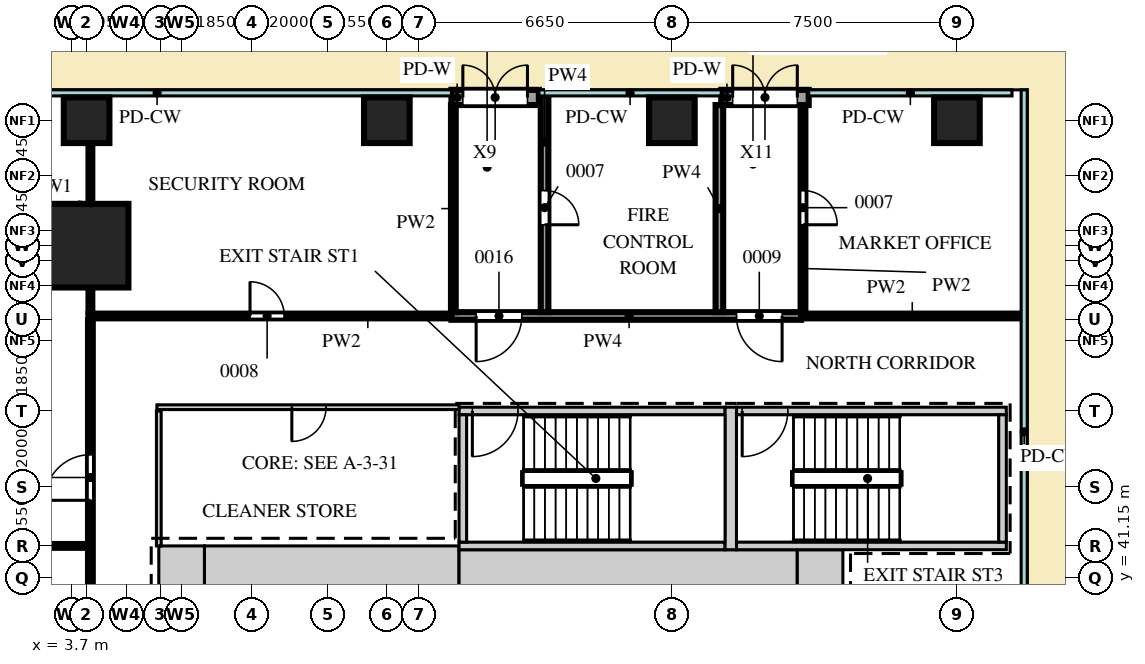
"""IFC4 building model, lengths in metres.
Left out: names, types, materials, properties, quantities, classifications, styles, units other than length and angle.
Written with IfcOpenShell. Run it as: python <this file> out.ifc"""

import sys

from ifc_helpers import new_model, si_unit, direction, frame, frame_2d, origin, origin_2d, place, context, subcontext, project, spatial, rectangle, extrude, source, transform, mapped, element, fill, save


model = new_model("IFC4")
c1 = context("Model", 3, precision=1e-05, world=origin(), true_north=direction((0.0, 1.0)))
c2 = subcontext(c1, "Body", "Model", "MODEL_VIEW")
j1 = project(units=[si_unit("LENGTHUNIT", "METRE"), si_unit("PLANEANGLEUNIT", "RADIAN")], contexts=[c1])
p1 = place(None, origin())
s1 = spatial("IfcSite", under=j1, at=p1, CompositionType="ELEMENT")
p2 = place(p1, origin())
s2 = spatial("IfcBuilding", under=s1, at=p2, CompositionType="ELEMENT")
p3 = place(p2, origin())
s3 = spatial("IfcBuildingStorey", under=s2, at=p3, CompositionType="ELEMENT", Elevation=0.0)
m1 = source(origin(), c2, "Body", "SweptSolid", [
    extrude(rectangle(XDim=6.7, YDim=1.2, at=frame_2d((3.35, 0.0))), origin(), (0.0, 0.0, 1.0), 7.2),
])
p4 = place(p3, frame((7.2, 41.4, 0.0), z_axis=(0.0, 0.0, 1.0), x_axis=(1.0, 0.0, 0.0)))
e1 = element("IfcWall", 1, at=p4, inside=s3, PredefinedType="SHEAR", context=c2, shape_type="MappedRepresentation", body=[
    mapped(m1, transform((0.0, 0.0, 0.0))),
])
m2 = source(origin(), c2, "Body", "SweptSolid", [
    extrude(rectangle(XDim=8.9, YDim=1.1, at=frame_2d((4.45, 0.0))), origin(), (0.0, 0.0, 1.0), 7.2),
])
p5 = place(p3, frame((13.9, 41.35, 0.0), z_axis=(0.0, 0.0, 1.0), x_axis=(1.0, 0.0, 0.0)))
e2 = element("IfcWall", 2, at=p5, inside=s3, PredefinedType="SHEAR", context=c2, shape_type="MappedRepresentation", body=[
    mapped(m2, transform((0.0, 0.0, 0.0))),
])
m3 = source(origin(), c2, "Body", "SweptSolid", [
    extrude(rectangle(XDim=1.2, YDim=1.1, at=frame_2d((0.6, 0.0))), origin(), (0.0, 0.0, 1.0), 7.2),
])
p6 = place(p3, frame((22.8, 41.35, 0.0), z_axis=(0.0, 0.0, 1.0), x_axis=(1.0, 0.0, 0.0)))
e3 = element("IfcWall", 3, at=p6, inside=s3, PredefinedType="SHEAR", context=c2, shape_type="MappedRepresentation", body=[
    mapped(m3, transform((0.0, 0.0, 0.0))),
])
m4 = source(origin(), c2, "Body", "SweptSolid", [
    extrude(rectangle(XDim=1.2, YDim=1.2, at=frame_2d((0.6, 0.0))), origin(), (0.0, 0.0, 1.0), 7.2),
])
p7 = place(p3, frame((6.0, 41.4, 0.0), z_axis=(0.0, 0.0, 1.0), x_axis=(1.0, 0.0, 0.0)))
e4 = element("IfcWall", 4, at=p7, inside=s3, PredefinedType="SHEAR", context=c2, shape_type="MappedRepresentation", body=[
    mapped(m4, transform((0.0, 0.0, 0.0))),
])
m5 = source(origin(), c2, "Body", "SweptSolid", [
    extrude(rectangle(XDim=7.0, YDim=0.2, at=frame_2d((3.5, 0.0))), origin(), (0.0, 0.0, 1.0), 7.2),
])
p8 = place(p3, frame((13.9, 45.55, 0.0), z_axis=(0.0, 0.0, 1.0), x_axis=(1.0, 0.0, 0.0)))
e5 = element("IfcWall", 5, at=p8, inside=s3, PredefinedType="SHEAR", context=c2, shape_type="MappedRepresentation", body=[
    mapped(m5, transform((0.0, 0.0, 0.0))),
])
m6 = source(origin(), c2, "Body", "SweptSolid", [
    extrude(rectangle(XDim=1.2, YDim=2.1, at=frame_2d((0.6, 1.05))), frame((0.0, 0.11, 0.0), z_axis=(0.0, -1.0, 0.0), x_axis=(1.0, 0.0, 0.0)), (0.0, 0.0, 1.0), 0.22),
])
p9 = place(p8, frame((0.35, 0.0, 0.0)))
e6 = element("IfcOpeningElement", 6, at=p9, cuts=e5, PredefinedType="OPENING", context=c2, shape_type="MappedRepresentation", body=[
    mapped(m6, transform((0.0, 0.0, 0.0))),
])
p10 = place(p3, frame((13.9, 42.0, 0.0), z_axis=(0.0, 0.0, 1.0), x_axis=(1.0, 0.0, 0.0)))
e7 = element("IfcWall", 7, at=p10, inside=s3, PredefinedType="SHEAR", context=c2, shape_type="MappedRepresentation", body=[
    mapped(m5, transform((0.0, 0.0, 0.0))),
])
m7 = source(origin(), c2, "Body", "SweptSolid", [
    extrude(rectangle(XDim=7.1, YDim=0.2, at=frame_2d((3.55, 0.0))), origin(), (0.0, 0.0, 1.0), 7.2),
])
p11 = place(p3, frame((21.2, 45.55, 0.0), z_axis=(0.0, 0.0, 1.0), x_axis=(1.0, 0.0, 0.0)))
e8 = element("IfcWall", 8, at=p11, inside=s3, PredefinedType="SHEAR", context=c2, shape_type="MappedRepresentation", body=[
    mapped(m7, transform((0.0, 0.0, 0.0))),
])
p12 = place(p11, frame((0.15, 0.0, 0.0)))
e9 = element("IfcOpeningElement", 9, at=p12, cuts=e8, PredefinedType="OPENING", context=c2, shape_type="MappedRepresentation", body=[
    mapped(m6, transform((0.0, 0.0, 0.0))),
])
p13 = place(p3, frame((21.2, 42.0, 0.0), z_axis=(0.0, 0.0, 1.0), x_axis=(1.0, 0.0, 0.0)))
e10 = element("IfcWall", 10, at=p13, inside=s3, PredefinedType="SHEAR", context=c2, shape_type="MappedRepresentation", body=[
    mapped(m7, transform((0.0, 0.0, 0.0))),
])
m8 = source(origin(), c2, "Body", "SweptSolid", [
    extrude(rectangle(XDim=3.75, YDim=0.3, at=frame_2d((1.875, 0.0))), origin(), (0.0, 0.0, 1.0), 7.2),
])
p14 = place(p3, frame((21.05, 41.9, 0.0), z_axis=(0.0, 0.0, 1.0), x_axis=(0.0, 1.0, 0.0)))
e11 = element("IfcWall", 11, at=p14, inside=s3, PredefinedType="SHEAR", context=c2, shape_type="MappedRepresentation", body=[
    mapped(m8, transform((0.0, 0.0, 0.0))),
])
m9 = source(origin(), c2, "Body", "SweptSolid", [
    extrude(rectangle(XDim=3.35, YDim=0.2, at=frame_2d((1.675, 0.0))), origin(), (0.0, 0.0, 1.0), 7.2),
])
for number, where, z_axis, x_axis in (
    (12, (14.0, 42.1, 0.0), (0.0, 0.0, 1.0), (0.0, 1.0, 0.0)),
    (13, (28.2, 42.1, 0.0), (0.0, 0.0, 1.0), (0.0, 1.0, 0.0)),
):
    element("IfcWall", number, at=place(p3, frame(where, z_axis=z_axis, x_axis=x_axis)), inside=s3, PredefinedType="SHEAR", context=c2, shape_type="MappedRepresentation", body=[
        mapped(m9, transform((0.0, 0.0, 0.0))),
    ])
m10 = source(origin(), c2, "Body", "SweptSolid", [
    extrude(rectangle(XDim=2.2, YDim=2.2, at=origin_2d()), origin(), (0.0, 0.0, 1.0), 7.2),
])
p15 = place(p3, frame((4.1, 49.9, 0.0), z_axis=(0.0, 0.0, 1.0), x_axis=(1.0, 0.0, 0.0)))
e14 = element("IfcColumn", 14, at=p15, inside=s3, PredefinedType="COLUMN", context=c2, shape_type="MappedRepresentation", body=[
    mapped(m10, transform((0.0, 0.0, 0.0))),
])
m11 = source(origin(), c2, "Body", "SweptSolid", [
    extrude(rectangle(XDim=1.2, YDim=1.2, at=origin_2d()), origin(), (0.0, 0.0, 1.0), 7.2),
])
for number, where, z_axis, x_axis in (
    (15, (4.1, 53.2, 0.0), (0.0, 0.0, 1.0), (1.0, 0.0, 0.0)),
    (16, (12.0, 53.2, 0.0), (0.0, 0.0, 1.0), (1.0, 0.0, 0.0)),
    (17, (19.5, 53.2, 0.0), (0.0, 0.0, 1.0), (1.0, 0.0, 0.0)),
    (18, (27.0, 53.2, 0.0), (0.0, 0.0, 1.0), (1.0, 0.0, 0.0)),
):
    element("IfcColumn", number, at=place(p3, frame(where, z_axis=z_axis, x_axis=x_axis)), inside=s3, PredefinedType="COLUMN", context=c2, shape_type="MappedRepresentation", body=[
        mapped(m11, transform((0.0, 0.0, 0.0))),
    ])
m12 = source(origin(), c2, "Body", "SweptSolid", [
    extrude(rectangle(XDim=2.3, YDim=0.4, at=frame_2d((1.15, 0.0))), origin(), (0.0, 0.0, 1.0), 7.15),
])
p16 = place(p3, frame((23.1, 53.8, 0.0), z_axis=(0.0, 0.0, 1.0), x_axis=(-1.0, 0.0, 0.0)))
e19 = element("IfcWall", 19, at=p16, inside=s3, PredefinedType="SOLIDWALL", context=c2, shape_type="MappedRepresentation", body=[
    mapped(m12, transform((0.0, 0.0, 0.0))),
])
m13 = source(origin(), c2, "Body", "SweptSolid", [
    extrude(rectangle(XDim=1.7, YDim=2.4, at=frame_2d((0.85, 1.2))), frame((0.0, 0.21, 0.0), z_axis=(0.0, -1.0, 0.0), x_axis=(1.0, 0.0, 0.0)), (0.0, 0.0, 1.0), 0.42),
])
p17 = place(p16, frame((2.0, 0.0, 0.0), z_axis=(0.0, 0.0, 1.0), x_axis=(-1.0, 0.0, 0.0)))
e20 = element("IfcOpeningElement", 20, at=p17, cuts=e19, PredefinedType="OPENING", context=c2, shape_type="MappedRepresentation", body=[
    mapped(m13, transform((0.0, 0.0, 0.0))),
])
p18 = place(p3, frame((16.0, 53.8, 0.0), z_axis=(0.0, 0.0, 1.0), x_axis=(-1.0, 0.0, 0.0)))
e21 = element("IfcWall", 21, at=p18, inside=s3, PredefinedType="SOLIDWALL", context=c2, shape_type="MappedRepresentation", body=[
    mapped(m12, transform((0.0, 0.0, 0.0))),
])
p19 = place(p18, frame((2.0, 0.0, 0.0), z_axis=(0.0, 0.0, 1.0), x_axis=(-1.0, 0.0, 0.0)))
e22 = element("IfcOpeningElement", 22, at=p19, cuts=e21, PredefinedType="OPENING", context=c2, shape_type="MappedRepresentation", body=[
    mapped(m13, transform((0.0, 0.0, 0.0))),
])
m14 = source(origin(), c2, "Body", "SweptSolid", [
    extrude(rectangle(XDim=41.8, YDim=0.125, at=frame_2d((20.9, 0.0))), origin(), (0.0, 0.0, 1.0), 7.2),
])
p20 = place(p3, frame((4.2, 6.15, 0.0), z_axis=(0.0, 0.0, 1.0), x_axis=(0.0, 1.0, 0.0)))
e23 = element("IfcWall", 23, at=p20, inside=s3, PredefinedType="PARTITIONING", context=c2, shape_type="MappedRepresentation", body=[
    mapped(m14, transform((0.0, 0.0, 0.0))),
])
m15 = source(origin(), c2, "Body", "SweptSolid", [
    extrude(rectangle(XDim=1.2, YDim=2.1, at=frame_2d((0.6, 1.05))), frame((0.0, 0.073, 0.0), z_axis=(0.0, -1.0, 0.0), x_axis=(1.0, 0.0, 0.0)), (0.0, 0.0, 1.0), 0.145),
])
p21 = place(p20, frame((4.45, 0.0, 0.0)))
e24 = element("IfcOpeningElement", 24, at=p21, cuts=e23, PredefinedType="OPENING", context=c2, shape_type="MappedRepresentation", body=[
    mapped(m15, transform((0.0, 0.0, 0.0))),
])
m16 = source(origin(), c2, "Body", "SweptSolid", [
    extrude(rectangle(XDim=0.9, YDim=2.1, at=frame_2d((0.45, 1.05))), frame((0.0, 0.073, 0.0), z_axis=(0.0, -1.0, 0.0), x_axis=(1.0, 0.0, 0.0)), (0.0, 0.0, 1.0), 0.145),
])
p22 = place(p20, frame((10.25, 0.0, 0.0)))
e25 = element("IfcOpeningElement", 25, at=p22, cuts=e23, PredefinedType="OPENING", context=c2, shape_type="MappedRepresentation", body=[
    mapped(m16, transform((0.0, 0.0, 0.0))),
])
p23 = place(p20, frame((20.25, 0.0, 0.0)))
e26 = element("IfcOpeningElement", 26, at=p23, cuts=e23, PredefinedType="OPENING", context=c2, shape_type="MappedRepresentation", body=[
    mapped(m15, transform((0.0, 0.0, 0.0))),
])
p24 = place(p20, frame((31.25, 0.0, 0.0)))
e27 = element("IfcOpeningElement", 27, at=p24, cuts=e23, PredefinedType="OPENING", context=c2, shape_type="MappedRepresentation", body=[
    mapped(m16, transform((0.0, 0.0, 0.0))),
])
p25 = place(p20, frame((37.05, 0.0, 0.0)))
e28 = element("IfcOpeningElement", 28, at=p25, cuts=e23, PredefinedType="OPENING", context=c2, shape_type="MappedRepresentation", body=[
    mapped(m15, transform((0.0, 0.0, 0.0))),
])
m17 = source(origin(), c2, "Body", "SweptSolid", [
    extrude(rectangle(XDim=13.0, YDim=0.1, at=frame_2d((6.5, 0.0))), origin(), (0.0, 0.0, 1.0), 7.2),
])
p26 = place(p3, frame((-8.9, 42.0, 0.0), z_axis=(0.0, 0.0, 1.0), x_axis=(1.0, 0.0, 0.0)))
e29 = element("IfcWall", 29, at=p26, inside=s3, PredefinedType="PARTITIONING", context=c2, shape_type="MappedRepresentation", body=[
    mapped(m17, transform((0.0, 0.0, 0.0))),
])
m18 = source(origin(), c2, "Body", "SweptSolid", [
    extrude(rectangle(XDim=3.55, YDim=0.125, at=frame_2d((1.775, 0.0))), origin(), (0.0, 0.0, 1.0), 7.2),
])
p27 = place(p3, frame((6.0, 42.0, 0.0), z_axis=(0.0, 0.0, 1.0), x_axis=(0.0, 1.0, 0.0)))
e30 = element("IfcWall", 30, at=p27, inside=s3, PredefinedType="PARTITIONING", context=c2, shape_type="MappedRepresentation", body=[
    mapped(m18, transform((0.0, 0.0, 0.0))),
])
m19 = source(origin(), c2, "Body", "SweptSolid", [
    extrude(rectangle(XDim=7.95, YDim=0.125, at=frame_2d((3.975, 0.0))), origin(), (0.0, 0.0, 1.0), 7.2),
])
p28 = place(p3, frame((5.95, 45.65, 0.0), z_axis=(0.0, 0.0, 1.0), x_axis=(1.0, 0.0, 0.0)))
e31 = element("IfcWall", 31, at=p28, inside=s3, PredefinedType="PARTITIONING", context=c2, shape_type="MappedRepresentation", body=[
    mapped(m19, transform((0.0, 0.0, 0.0))),
])
p29 = place(p28, frame((3.55, 0.0, 0.0)))
e32 = element("IfcOpeningElement", 32, at=p29, cuts=e31, PredefinedType="OPENING", context=c2, shape_type="MappedRepresentation", body=[
    mapped(m16, transform((0.0, 0.0, 0.0))),
])
m20 = source(origin(), c2, "Body", "SweptSolid", [
    extrude(rectangle(XDim=9.55, YDim=0.125, at=frame_2d((4.775, 0.0))), origin(), (0.0, 0.0, 1.0), 7.2),
])
p30 = place(p3, frame((4.15, 48.05, 0.0), z_axis=(0.0, 0.0, 1.0), x_axis=(1.0, 0.0, 0.0)))
e33 = element("IfcWall", 33, at=p30, inside=s3, PredefinedType="PARTITIONING", context=c2, shape_type="MappedRepresentation", body=[
    mapped(m20, transform((0.0, 0.0, 0.0))),
])
p31 = place(p30, frame((4.25, 0.0, 0.0)))
e34 = element("IfcOpeningElement", 34, at=p31, cuts=e33, PredefinedType="OPENING", context=c2, shape_type="MappedRepresentation", body=[
    mapped(m16, transform((0.0, 0.0, 0.0))),
])
m21 = source(origin(), c2, "Body", "SweptSolid", [
    extrude(rectangle(XDim=9.2, YDim=0.2, at=frame_2d((4.6, 0.0))), origin(), (0.0, 0.0, 1.0), 7.2),
])
p32 = place(p3, frame((13.7, 48.05, 0.0), z_axis=(0.0, 0.0, 1.0), x_axis=(1.0, 0.0, 0.0)))
e35 = element("IfcWall", 35, at=p32, inside=s3, PredefinedType="PARTITIONING", context=c2, shape_type="MappedRepresentation", body=[
    mapped(m21, transform((0.0, 0.0, 0.0))),
])
p33 = place(p32, frame((0.65, 0.0, 0.0)))
e36 = element("IfcOpeningElement", 36, at=p33, cuts=e35, PredefinedType="OPENING", context=c2, shape_type="MappedRepresentation", body=[
    mapped(m6, transform((0.0, 0.0, 0.0))),
])
p34 = place(p32, frame((7.5, 0.0, 0.0)))
e37 = element("IfcOpeningElement", 37, at=p34, cuts=e35, PredefinedType="OPENING", context=c2, shape_type="MappedRepresentation", body=[
    mapped(m6, transform((0.0, 0.0, 0.0))),
])
m22 = source(origin(), c2, "Body", "SweptSolid", [
    extrude(rectangle(XDim=5.85, YDim=0.125, at=frame_2d((2.925, 0.0))), origin(), (0.0, 0.0, 1.0), 7.2),
])
p35 = place(p3, frame((22.9, 48.05, 0.0), z_axis=(0.0, 0.0, 1.0), x_axis=(1.0, 0.0, 0.0)))
e38 = element("IfcWall", 38, at=p35, inside=s3, PredefinedType="PARTITIONING", context=c2, shape_type="MappedRepresentation", body=[
    mapped(m22, transform((0.0, 0.0, 0.0))),
])
m23 = source(origin(), c2, "Body", "SweptSolid", [
    extrude(rectangle(XDim=5.75, YDim=0.1, at=frame_2d((2.875, 0.0))), origin(), (0.0, 0.0, 1.0), 7.2),
])
p36 = place(p3, frame((4.2, 48.15, 0.0), z_axis=(0.0, 0.0, 1.0), x_axis=(0.0, 1.0, 0.0)))
e39 = element("IfcWall", 39, at=p36, inside=s3, PredefinedType="PARTITIONING", context=c2, shape_type="MappedRepresentation", body=[
    mapped(m23, transform((0.0, 0.0, 0.0))),
])
m24 = source(origin(), c2, "Body", "SweptSolid", [
    extrude(rectangle(XDim=5.45, YDim=0.125, at=frame_2d((2.725, 0.0))), origin(), (0.0, 0.0, 1.0), 7.2),
])
p37 = place(p3, frame((13.75, 48.15, 0.0), z_axis=(0.0, 0.0, 1.0), x_axis=(0.0, 1.0, 0.0)))
e40 = element("IfcWall", 40, at=p37, inside=s3, PredefinedType="PARTITIONING", context=c2, shape_type="MappedRepresentation", body=[
    mapped(m24, transform((0.0, 0.0, 0.0))),
])
m25 = source(origin(), c2, "Body", "SweptSolid", [
    extrude(rectangle(XDim=5.75, YDim=0.2, at=frame_2d((2.875, 0.0))), origin(), (0.0, 0.0, 1.0), 7.2),
])
p38 = place(p3, frame((16.15, 48.15, 0.0), z_axis=(0.0, 0.0, 1.0), x_axis=(0.0, 1.0, 0.0)))
e41 = element("IfcWall", 41, at=p38, inside=s3, PredefinedType="PARTITIONING", context=c2, shape_type="MappedRepresentation", body=[
    mapped(m25, transform((0.0, 0.0, 0.0))),
])
m26 = source(origin(), c2, "Body", "SweptSolid", [
    extrude(rectangle(XDim=0.9, YDim=2.1, at=frame_2d((0.45, 1.05))), frame((0.0, 0.11, 0.0), z_axis=(0.0, -1.0, 0.0), x_axis=(1.0, 0.0, 0.0)), (0.0, 0.0, 1.0), 0.22),
])
p39 = place(p38, frame((2.3, 0.0, 0.0)))
e42 = element("IfcOpeningElement", 42, at=p39, cuts=e41, PredefinedType="OPENING", context=c2, shape_type="MappedRepresentation", body=[
    mapped(m26, transform((0.0, 0.0, 0.0))),
])
m27 = source(origin(), c2, "Body", "SweptSolid", [
    extrude(rectangle(XDim=5.45, YDim=0.2, at=frame_2d((2.725, 0.0))), origin(), (0.0, 0.0, 1.0), 7.2),
])
p40 = place(p3, frame((20.75, 48.15, 0.0), z_axis=(0.0, 0.0, 1.0), x_axis=(0.0, 1.0, 0.0)))
e43 = element("IfcWall", 43, at=p40, inside=s3, PredefinedType="PARTITIONING", context=c2, shape_type="MappedRepresentation", body=[
    mapped(m27, transform((0.0, 0.0, 0.0))),
])
p41 = place(p3, frame((22.95, 48.15, 0.0), z_axis=(0.0, 0.0, 1.0), x_axis=(0.0, 1.0, 0.0)))
e44 = element("IfcWall", 44, at=p41, inside=s3, PredefinedType="PARTITIONING", context=c2, shape_type="MappedRepresentation", body=[
    mapped(m24, transform((0.0, 0.0, 0.0))),
])
p42 = place(p41, frame((2.3, 0.0, 0.0)))
e45 = element("IfcOpeningElement", 45, at=p42, cuts=e44, PredefinedType="OPENING", context=c2, shape_type="MappedRepresentation", body=[
    mapped(m16, transform((0.0, 0.0, 0.0))),
])
m28 = source(origin(), c2, "Body", "SweptSolid", [
    extrude(rectangle(XDim=1.7, YDim=2.4, at=frame_2d((0.85, 1.2))), frame((0.0, 0.025, 0.0), z_axis=(0.0, -1.0, 0.0), x_axis=(1.0, 0.0, 0.0)), (0.0, 0.0, 1.0), 0.05),
])
p43 = place(p17, origin())
e46 = element("IfcDoor", 46, at=p43, inside=s3, OperationType="DOUBLE_DOOR_SINGLE_SWING", PredefinedType="DOOR", context=c2, shape_type="MappedRepresentation", body=[
    mapped(m28, transform((0.0, 0.0, 0.0))),
])
fill(e20, e46)
p44 = place(p19, origin())
e47 = element("IfcDoor", 47, at=p44, inside=s3, OperationType="DOUBLE_DOOR_SINGLE_SWING", PredefinedType="DOOR", context=c2, shape_type="MappedRepresentation", body=[
    mapped(m28, transform((0.0, 0.0, 0.0))),
])
fill(e22, e47)
m29 = source(origin(), c2, "Body", "SweptSolid", [
    extrude(rectangle(XDim=1.2, YDim=2.1, at=frame_2d((0.6, 1.05))), frame((0.0, 0.025, 0.0), z_axis=(0.0, -1.0, 0.0), x_axis=(1.0, 0.0, 0.0)), (0.0, 0.0, 1.0), 0.05),
])
p45 = place(p33, origin())
e48 = element("IfcDoor", 48, at=p45, inside=s3, OperationType="SINGLE_SWING_LEFT", PredefinedType="DOOR", context=c2, shape_type="MappedRepresentation", body=[
    mapped(m29, transform((0.0, 0.0, 0.0))),
])
fill(e36, e48)
p46 = place(p34, origin())
e49 = element("IfcDoor", 49, at=p46, inside=s3, OperationType="SINGLE_SWING_RIGHT", PredefinedType="DOOR", context=c2, shape_type="MappedRepresentation", body=[
    mapped(m29, transform((0.0, 0.0, 0.0))),
])
fill(e37, e49)
m30 = source(origin(), c2, "Body", "SweptSolid", [
    extrude(rectangle(XDim=0.9, YDim=2.1, at=frame_2d((0.45, 1.05))), frame((0.0, 0.025, 0.0), z_axis=(0.0, -1.0, 0.0), x_axis=(1.0, 0.0, 0.0)), (0.0, 0.0, 1.0), 0.05),
])
p47 = place(p31, origin())
e50 = element("IfcDoor", 50, at=p47, inside=s3, OperationType="SINGLE_SWING_RIGHT", PredefinedType="DOOR", context=c2, shape_type="MappedRepresentation", body=[
    mapped(m30, transform((0.0, 0.0, 0.0))),
])
fill(e34, e50)
p48 = place(p39, origin())
e51 = element("IfcDoor", 51, at=p48, inside=s3, OperationType="SINGLE_SWING_LEFT", PredefinedType="DOOR", context=c2, shape_type="MappedRepresentation", body=[
    mapped(m30, transform((0.0, 0.0, 0.0))),
])
fill(e42, e51)
p49 = place(p42, origin())
e52 = element("IfcDoor", 52, at=p49, inside=s3, OperationType="SINGLE_SWING_LEFT", PredefinedType="DOOR", context=c2, shape_type="MappedRepresentation", body=[
    mapped(m30, transform((0.0, 0.0, 0.0))),
])
fill(e45, e52)
p50 = place(p29, origin())
e53 = element("IfcDoor", 53, at=p50, inside=s3, OperationType="SINGLE_SWING_LEFT", PredefinedType="DOOR", context=c2, shape_type="MappedRepresentation", body=[
    mapped(m30, transform((0.0, 0.0, 0.0))),
])
fill(e32, e53)
p51 = place(p25, origin())
e54 = element("IfcDoor", 54, at=p51, inside=s3, OperationType="SINGLE_SWING_RIGHT", PredefinedType="DOOR", context=c2, shape_type="MappedRepresentation", body=[
    mapped(m29, transform((0.0, 0.0, 0.0))),
])
fill(e28, e54)
p52 = place(p9, origin())
e55 = element("IfcDoor", 55, at=p52, inside=s3, OperationType="SINGLE_SWING_LEFT", PredefinedType="DOOR", context=c2, shape_type="MappedRepresentation", body=[
    mapped(m29, transform((0.0, 0.0, 0.0))),
])
fill(e6, e55)
p53 = place(p12, origin())
e56 = element("IfcDoor", 56, at=p53, inside=s3, OperationType="SINGLE_SWING_LEFT", PredefinedType="DOOR", context=c2, shape_type="MappedRepresentation", body=[
    mapped(m29, transform((0.0, 0.0, 0.0))),
])
fill(e9, e56)
save(model, sys.argv[1])
